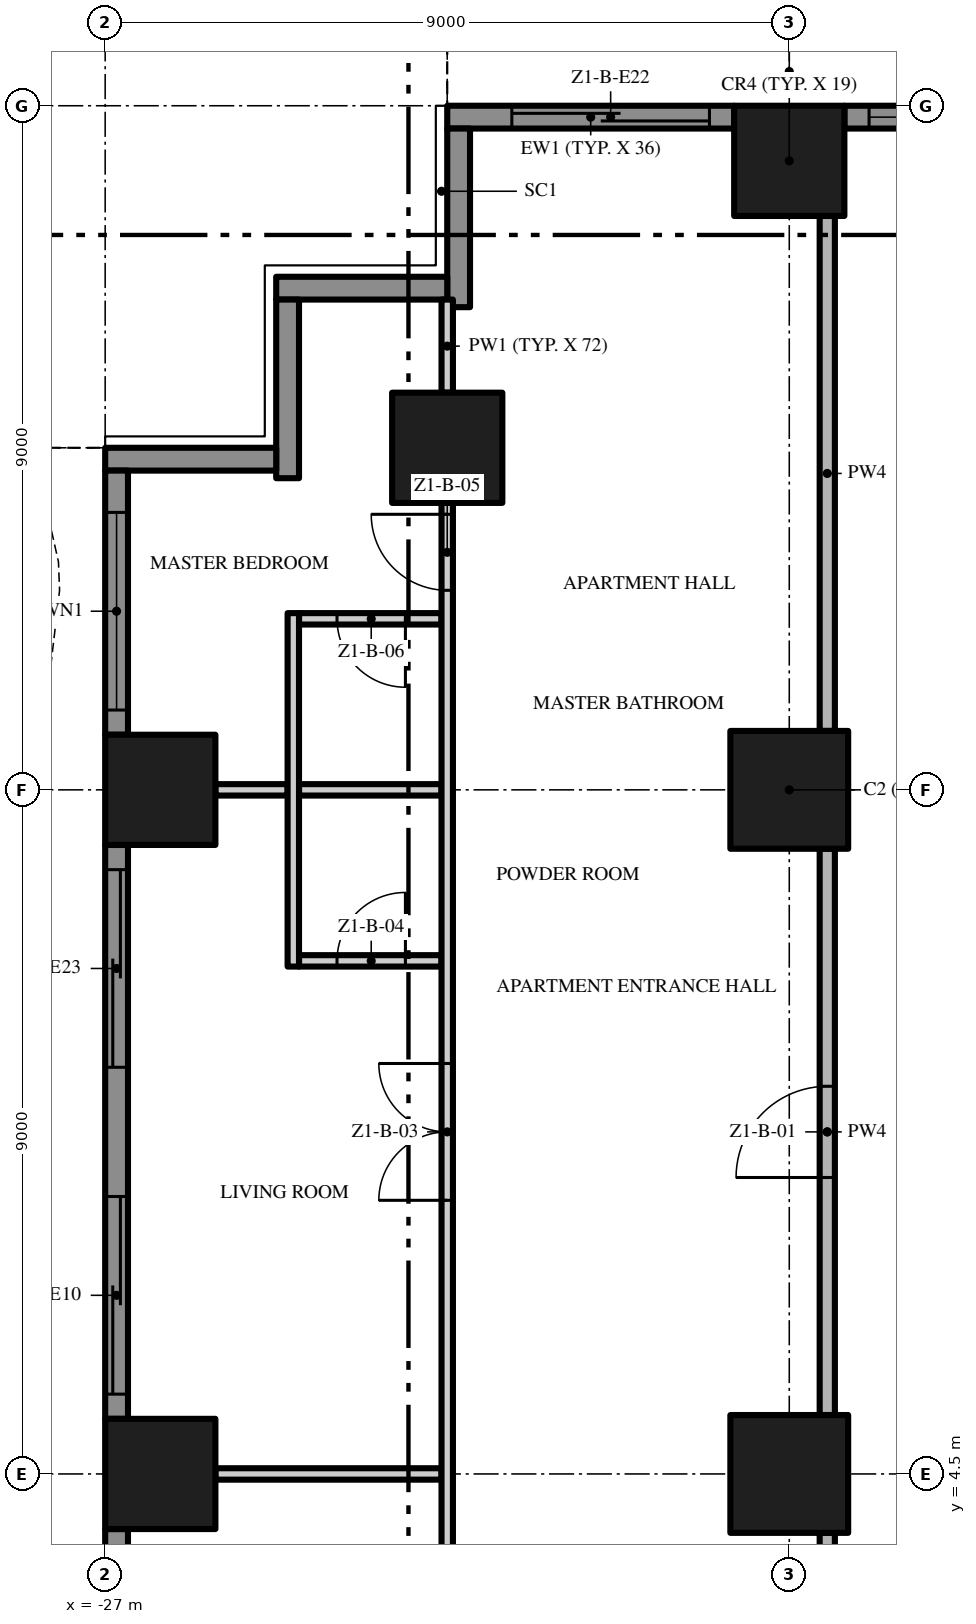
"""IFC4 building model, lengths in metres.
Left out: names, types, materials, properties, quantities, classifications, styles, units other than length and angle.
Written with IfcOpenShell. Run it as: python <this file> out.ifc"""

import sys

from ifc_helpers import new_model, si_unit, direction, frame, frame_2d, origin, origin_2d, place, context, subcontext, project, spatial, polyline, rectangle, outline, extrude, element, fill, save


model = new_model("IFC4")
c1 = context("Model", 3, precision=1e-05, world=origin(), true_north=direction((0.0, 1.0)))
c2 = subcontext(c1, "Body", "Model", "MODEL_VIEW")
j1 = project(units=[si_unit("LENGTHUNIT", "METRE"), si_unit("PLANEANGLEUNIT", "RADIAN")], contexts=[c1])
p1 = place(None, origin())
s1 = spatial("IfcSite", under=j1, at=p1, CompositionType="ELEMENT")
p2 = place(p1, origin())
s2 = spatial("IfcBuilding", under=s1, at=p2, CompositionType="ELEMENT")
p3 = place(p2, frame((0.0, 0.0, 34.0)))
s3 = spatial("IfcBuildingStorey", under=s2, at=p3, CompositionType="ELEMENT", Elevation=34.0)
p4 = place(p3, frame((-18.0, 13.5, 0.0), z_axis=(0.0, 0.0, 1.0), x_axis=(1.0, 0.0, 0.0)))
e1 = element("IfcColumn", 1, at=p4, inside=s3, PredefinedType="COLUMN", context=c2, shape_type="SweptSolid", body=[
    extrude(rectangle(XDim=1.55, YDim=1.55, at=origin_2d()), origin(), (0.0, 0.0, 1.0), 3.5),
])
p5 = place(p3, frame((-18.0, 21.775, 0.0), z_axis=(0.0, 0.0, 1.0), x_axis=(1.0, 0.0, 0.0)))
e2 = element("IfcColumn", 2, at=p5, inside=s3, PredefinedType="COLUMN", context=c2, shape_type="SweptSolid", body=[
    extrude(rectangle(XDim=1.45, YDim=1.45, at=origin_2d()), origin(), (0.0, 0.0, 1.0), 3.5),
])
p6 = place(p3, frame((-18.0, 4.5, 0.0), z_axis=(0.0, 0.0, 1.0), x_axis=(1.0, 0.0, 0.0)))
e3 = element("IfcColumn", 3, at=p6, inside=s3, PredefinedType="COLUMN", context=c2, shape_type="SweptSolid", body=[
    extrude(rectangle(XDim=1.55, YDim=1.55, at=origin_2d()), origin(), (0.0, 0.0, 1.0), 3.5),
])
for number, where, z_axis, x_axis in (
    (4, (-26.275, 13.5, 0.0), (0.0, 0.0, 1.0), (1.0, 0.0, 0.0)),
    (5, (-22.5, 18.0, 0.0), (0.0, 0.0, 1.0), (1.0, 0.0, 0.0)),
    (6, (-26.275, 4.5, 0.0), (0.0, 0.0, 1.0), (1.0, 0.0, 0.0)),
):
    element("IfcColumn", number, at=place(p3, frame(where, z_axis=z_axis, x_axis=x_axis)), inside=s3, PredefinedType="COLUMN", context=c2, shape_type="SweptSolid", body=[
        extrude(rectangle(XDim=1.45, YDim=1.45, at=origin_2d()), origin(), (0.0, 0.0, 1.0), 3.5),
    ])
p7 = place(p3, frame((-17.275, 22.35, 0.0), z_axis=(0.0, 0.0, 1.0), x_axis=(1.0, 0.0, 0.0)))
e7 = element("IfcWall", 7, at=p7, inside=s3, PredefinedType="SOLIDWALL", context=c2, shape_type="SweptSolid", body=[
    extrude(rectangle(XDim=3.775, YDim=0.3, at=frame_2d((1.887, 0.0))), origin(), (0.0, 0.0, 1.0), 3.5),
])
p8 = place(p7, frame((0.325, 0.0, 0.45)))
e8 = element("IfcOpeningElement", 8, at=p8, cuts=e7, PredefinedType="OPENING", context=c2, shape_type="SweptSolid", body=[
    extrude(rectangle(XDim=2.6, YDim=2.65, at=frame_2d((1.3, 1.325))), frame((0.0, 0.16, 0.0), z_axis=(0.0, -1.0, 0.0), x_axis=(1.0, 0.0, 0.0)), (0.0, 0.0, 1.0), 0.32),
])
p9 = place(p3, frame((-22.5, 22.35, 0.0), z_axis=(0.0, 0.0, 1.0), x_axis=(1.0, 0.0, 0.0)))
e9 = element("IfcWall", 9, at=p9, inside=s3, PredefinedType="SOLIDWALL", context=c2, shape_type="SweptSolid", body=[
    extrude(rectangle(XDim=3.775, YDim=0.3, at=frame_2d((1.887, 0.0))), origin(), (0.0, 0.0, 1.0), 3.5),
])
p10 = place(p9, frame((0.85, 0.0, 0.0)))
e10 = element("IfcOpeningElement", 10, at=p10, cuts=e9, PredefinedType="OPENING", context=c2, shape_type="SweptSolid", body=[
    extrude(rectangle(XDim=2.6, YDim=2.4, at=frame_2d((1.3, 1.2))), frame((0.0, 0.16, 0.0), z_axis=(0.0, -1.0, 0.0), x_axis=(1.0, 0.0, 0.0)), (0.0, 0.0, 1.0), 0.32),
])
p11 = place(p3, frame((-22.35, 19.85, 0.0), z_axis=(0.0, 0.0, 1.0), x_axis=(0.0, 1.0, 0.0)))
e11 = element("IfcWall", 11, at=p11, inside=s3, PredefinedType="SOLIDWALL", context=c2, shape_type="SweptSolid", body=[
    extrude(rectangle(XDim=2.35, YDim=0.3, at=frame_2d((1.175, 0.0))), origin(), (0.0, 0.0, 1.0), 3.5),
])
p12 = place(p3, frame((-24.75, 20.1, 0.0), z_axis=(0.0, 0.0, 1.0), x_axis=(1.0, 0.0, 0.0)))
e12 = element("IfcWall", 12, at=p12, inside=s3, PredefinedType="SOLIDWALL", context=c2, shape_type="SweptSolid", body=[
    extrude(rectangle(XDim=2.25, YDim=0.3, at=frame_2d((1.125, 0.0))), origin(), (0.0, 0.0, 1.0), 3.5),
])
p13 = place(p3, frame((-24.6, 17.6, 0.0), z_axis=(0.0, 0.0, 1.0), x_axis=(0.0, 1.0, 0.0)))
e13 = element("IfcWall", 13, at=p13, inside=s3, PredefinedType="SOLIDWALL", context=c2, shape_type="SweptSolid", body=[
    extrude(rectangle(XDim=2.35, YDim=0.3, at=frame_2d((1.175, 0.0))), origin(), (0.0, 0.0, 1.0), 3.5),
])
p14 = place(p3, frame((-27.0, 17.85, 0.0), z_axis=(0.0, 0.0, 1.0), x_axis=(1.0, 0.0, 0.0)))
e14 = element("IfcWall", 14, at=p14, inside=s3, PredefinedType="SOLIDWALL", context=c2, shape_type="SweptSolid", body=[
    extrude(rectangle(XDim=2.25, YDim=0.3, at=frame_2d((1.125, 0.0))), origin(), (0.0, 0.0, 1.0), 3.5),
])
p15 = place(p3, frame((-26.85, 14.225, 0.0), z_axis=(0.0, 0.0, 1.0), x_axis=(0.0, 1.0, 0.0)))
e15 = element("IfcWall", 15, at=p15, inside=s3, PredefinedType="SOLIDWALL", context=c2, shape_type="SweptSolid", body=[
    extrude(rectangle(XDim=3.475, YDim=0.3, at=frame_2d((1.738, 0.0))), origin(), (0.0, 0.0, 1.0), 3.5),
])
p16 = place(p15, frame((0.325, 0.0, 0.45)))
e16 = element("IfcOpeningElement", 16, at=p16, cuts=e15, PredefinedType="OPENING", context=c2, shape_type="SweptSolid", body=[
    extrude(rectangle(XDim=2.6, YDim=2.65, at=frame_2d((1.3, 1.325))), frame((0.0, 0.16, 0.0), z_axis=(0.0, -1.0, 0.0), x_axis=(1.0, 0.0, 0.0)), (0.0, 0.0, 1.0), 0.32),
])
p17 = place(p3, frame((-26.85, 5.225, 0.0), z_axis=(0.0, 0.0, 1.0), x_axis=(0.0, 1.0, 0.0)))
e17 = element("IfcWall", 17, at=p17, inside=s3, PredefinedType="SOLIDWALL", context=c2, shape_type="SweptSolid", body=[
    extrude(rectangle(XDim=7.55, YDim=0.3, at=frame_2d((3.775, 0.0))), origin(), (0.0, 0.0, 1.0), 3.5),
])
p18 = place(p17, frame((4.625, 0.0, 0.0)))
e18 = element("IfcOpeningElement", 18, at=p18, cuts=e17, PredefinedType="OPENING", context=c2, shape_type="SweptSolid", body=[
    extrude(rectangle(XDim=2.6, YDim=2.4, at=frame_2d((1.3, 1.2))), frame((0.0, 0.16, 0.0), z_axis=(0.0, -1.0, 0.0), x_axis=(1.0, 0.0, 0.0)), (0.0, 0.0, 1.0), 0.32),
])
p19 = place(p17, frame((0.325, 0.0, 0.0)))
e19 = element("IfcOpeningElement", 19, at=p19, cuts=e17, PredefinedType="OPENING", context=c2, shape_type="SweptSolid", body=[
    extrude(rectangle(XDim=2.6, YDim=2.4, at=frame_2d((1.3, 1.2))), frame((0.0, 0.16, 0.0), z_axis=(0.0, -1.0, 0.0), x_axis=(1.0, 0.0, 0.0)), (0.0, 0.0, 1.0), 0.32),
])
p20 = place(p3, frame((-26.85, -3.775, 0.0), z_axis=(0.0, 0.0, 1.0), x_axis=(0.0, 1.0, 0.0)))
e20 = element("IfcWall", 20, at=p20, inside=s3, PredefinedType="SOLIDWALL", context=c2, shape_type="SweptSolid", body=[
    extrude(rectangle(XDim=7.55, YDim=0.3, at=frame_2d((3.775, 0.0))), origin(), (0.0, 0.0, 1.0), 3.5),
])
p21 = place(p20, frame((4.625, 0.0, 0.45)))
e21 = element("IfcOpeningElement", 21, at=p21, cuts=e20, PredefinedType="OPENING", context=c2, shape_type="SweptSolid", body=[
    extrude(rectangle(XDim=2.6, YDim=2.65, at=frame_2d((1.3, 1.325))), frame((0.0, 0.16, 0.0), z_axis=(0.0, -1.0, 0.0), x_axis=(1.0, 0.0, 0.0)), (0.0, 0.0, 1.0), 0.32),
])
p22 = place(p20, frame((0.325, 0.0, 0.45)))
e22 = element("IfcOpeningElement", 22, at=p22, cuts=e20, PredefinedType="OPENING", context=c2, shape_type="SweptSolid", body=[
    extrude(rectangle(XDim=2.6, YDim=2.65, at=frame_2d((1.3, 1.325))), frame((0.0, 0.16, 0.0), z_axis=(0.0, -1.0, 0.0), x_axis=(1.0, 0.0, 0.0)), (0.0, 0.0, 1.0), 0.32),
])
p23 = place(p3, origin())
e23 = element("IfcWall", 23, at=p23, inside=s3, PredefinedType="USERDEFINED", context=c2, shape_type="SweptSolid", body=[
    extrude(outline(polyline([(-13.5, 23.451), (-15.0, 23.115), (-15.375, 23.1), (-16.5, 23.231), (-18.0, 23.755), (-19.5, 24.488), (-21.0, 25.149), (-22.5, 25.485), (-22.555, 25.241), (-21.079, 24.91), (-19.605, 24.261), (-18.096, 23.524), (-16.556, 22.986), (-15.385, 22.849), (-14.967, 22.866), (-13.445, 23.208), (-13.5, 23.451)])), origin(), (0.0, 0.0, 1.0), 0.9),
])
p24 = place(p3, origin())
e24 = element("IfcWall", 24, at=p24, inside=s3, PredefinedType="USERDEFINED", context=c2, shape_type="SweptSolid", body=[
    extrude(outline(polyline([(-27.951, 18.0), (-27.615, 16.5), (-27.6, 16.125), (-27.731, 15.0), (-28.255, 13.5), (-28.988, 12.0), (-29.649, 10.5), (-29.985, 9.0), (-30.0, 8.625), (-29.869, 7.5), (-29.345, 6.0), (-28.612, 4.5), (-27.951, 3.0), (-27.615, 1.5), (-27.6, 1.125), (-27.731, 0.0), (-28.255, -1.5), (-28.988, -3.0), (-29.649, -4.5), (-29.985, -6.0), (-30.0, -6.375), (-29.869, -7.5), (-29.345, -9.0), (-28.612, -10.5), (-27.951, -12.0), (-27.615, -13.5), (-27.6, -13.875), (-27.731, -15.0), (-28.255, -16.5), (-28.988, -18.0), (-28.763, -18.11), (-28.024, -16.596), (-27.486, -15.056), (-27.349, -13.885), (-27.366, -13.467), (-27.713, -11.921), (-28.385, -10.395), (-29.114, -8.904), (-29.624, -7.444), (-29.749, -6.365), (-29.736, -6.033), (-29.41, -4.579), (-28.761, -3.105), (-28.024, -1.596), (-27.486, -0.056), (-27.349, 1.115), (-27.366, 1.533), (-27.713, 3.079), (-28.385, 4.605), (-29.114, 6.096), (-29.624, 7.556), (-29.749, 8.635), (-29.736, 8.967), (-29.41, 10.421), (-28.761, 11.895), (-28.024, 13.404), (-27.486, 14.944), (-27.349, 16.115), (-27.366, 16.533), (-27.708, 18.055), (-27.951, 18.0)])), origin(), (0.0, 0.0, 1.0), 0.9),
])
p25 = place(p3, frame((-25.55, 4.5, 0.0), z_axis=(0.0, 0.0, 1.0), x_axis=(1.0, 0.0, 0.0)))
e25 = element("IfcWall", 25, at=p25, inside=s3, PredefinedType="PARTITIONING", context=c2, shape_type="SweptSolid", body=[
    extrude(rectangle(XDim=2.975, YDim=0.15, at=frame_2d((1.488, 0.0))), origin(), (0.0, 0.0, 1.0), 3.5),
])
p26 = place(p3, frame((-24.45, 11.25, 0.0), z_axis=(0.0, 0.0, 1.0), x_axis=(1.0, 0.0, 0.0)))
e26 = element("IfcWall", 26, at=p26, inside=s3, PredefinedType="PARTITIONING", context=c2, shape_type="SweptSolid", body=[
    extrude(rectangle(XDim=1.875, YDim=0.15, at=frame_2d((0.938, 0.0))), origin(), (0.0, 0.0, 1.0), 3.5),
])
p27 = place(p26, frame((0.5, 0.0, 0.0)))
e27 = element("IfcOpeningElement", 27, at=p27, cuts=e26, PredefinedType="OPENING", context=c2, shape_type="SweptSolid", body=[
    extrude(rectangle(XDim=0.9, YDim=2.1, at=frame_2d((0.45, 1.05))), frame((0.0, 0.085, 0.0), z_axis=(0.0, -1.0, 0.0), x_axis=(1.0, 0.0, 0.0)), (0.0, 0.0, 1.0), 0.17),
])
p28 = place(p3, frame((-25.55, 13.5, 0.0), z_axis=(0.0, 0.0, 1.0), x_axis=(1.0, 0.0, 0.0)))
e28 = element("IfcWall", 28, at=p28, inside=s3, PredefinedType="PARTITIONING", context=c2, shape_type="SweptSolid", body=[
    extrude(rectangle(XDim=0.95, YDim=0.15, at=frame_2d((0.475, 0.0))), origin(), (0.0, 0.0, 1.0), 3.5),
])
p29 = place(p3, frame((-24.45, 13.5, 0.0), z_axis=(0.0, 0.0, 1.0), x_axis=(1.0, 0.0, 0.0)))
e29 = element("IfcWall", 29, at=p29, inside=s3, PredefinedType="PARTITIONING", context=c2, shape_type="SweptSolid", body=[
    extrude(rectangle(XDim=1.875, YDim=0.15, at=frame_2d((0.938, 0.0))), origin(), (0.0, 0.0, 1.0), 3.5),
])
p30 = place(p3, frame((-22.575, 15.75, 0.0), z_axis=(0.0, 0.0, 1.0), x_axis=(-1.0, 0.0, 0.0)))
e30 = element("IfcWall", 30, at=p30, inside=s3, PredefinedType="PARTITIONING", context=c2, shape_type="SweptSolid", body=[
    extrude(rectangle(XDim=1.875, YDim=0.15, at=frame_2d((0.938, 0.0))), origin(), (0.0, 0.0, 1.0), 3.5),
])
p31 = place(p30, frame((0.475, 0.0, 0.0)))
e31 = element("IfcOpeningElement", 31, at=p31, cuts=e30, PredefinedType="OPENING", context=c2, shape_type="SweptSolid", body=[
    extrude(rectangle(XDim=0.9, YDim=2.1, at=frame_2d((0.45, 1.05))), frame((0.0, 0.085, 0.0), z_axis=(0.0, -1.0, 0.0), x_axis=(1.0, 0.0, 0.0)), (0.0, 0.0, 1.0), 0.17),
])
p32 = place(p3, frame((-24.525, 11.175, 0.0), z_axis=(0.0, 0.0, 1.0), x_axis=(0.0, 1.0, 0.0)))
e32 = element("IfcWall", 32, at=p32, inside=s3, PredefinedType="PARTITIONING", context=c2, shape_type="SweptSolid", body=[
    extrude(rectangle(XDim=4.65, YDim=0.15, at=frame_2d((2.325, 0.0))), origin(), (0.0, 0.0, 1.0), 3.5),
])
p33 = place(p3, frame((-22.5, 0.1, 0.0), z_axis=(0.0, 0.0, 1.0), x_axis=(0.0, 1.0, 0.0)))
e33 = element("IfcWall", 33, at=p33, inside=s3, PredefinedType="PARTITIONING", context=c2, shape_type="SweptSolid", body=[
    extrude(rectangle(XDim=17.175, YDim=0.15, at=frame_2d((8.588, 0.0))), origin(), (0.0, 0.0, 1.0), 3.5),
])
p34 = place(p33, frame((1.65, 0.0, 0.0)))
e34 = element("IfcOpeningElement", 34, at=p34, cuts=e33, PredefinedType="OPENING", context=c2, shape_type="SweptSolid", body=[
    extrude(rectangle(XDim=1.0, YDim=2.4, at=frame_2d((0.5, 1.2))), frame((0.0, 0.085, 0.0), z_axis=(0.0, -1.0, 0.0), x_axis=(1.0, 0.0, 0.0)), (0.0, 0.0, 1.0), 0.17),
])
p35 = place(p33, frame((8.0, 0.0, 0.0)))
e35 = element("IfcOpeningElement", 35, at=p35, cuts=e33, PredefinedType="OPENING", context=c2, shape_type="SweptSolid", body=[
    extrude(rectangle(XDim=1.8, YDim=2.4, at=frame_2d((0.9, 1.2))), frame((0.0, 0.085, 0.0), z_axis=(0.0, -1.0, 0.0), x_axis=(1.0, 0.0, 0.0)), (0.0, 0.0, 1.0), 0.17),
])
p36 = place(p33, frame((16.025, 0.0, 0.0)))
e36 = element("IfcOpeningElement", 36, at=p36, cuts=e33, PredefinedType="OPENING", context=c2, shape_type="SweptSolid", body=[
    extrude(rectangle(XDim=1.0, YDim=2.4, at=frame_2d((0.5, 1.2))), frame((0.0, 0.085, 0.0), z_axis=(0.0, -1.0, 0.0), x_axis=(1.0, 0.0, 0.0)), (0.0, 0.0, 1.0), 0.17),
])
p37 = place(p3, frame((-22.5, 18.725, 0.0), z_axis=(0.0, 0.0, 1.0), x_axis=(0.0, 1.0, 0.0)))
e37 = element("IfcWall", 37, at=p37, inside=s3, PredefinedType="PARTITIONING", context=c2, shape_type="SweptSolid", body=[
    extrude(rectangle(XDim=1.225, YDim=0.15, at=frame_2d((0.613, 0.0))), origin(), (0.0, 0.0, 1.0), 3.5),
])
p38 = place(p3, frame((-17.5, -0.2, 0.0), z_axis=(0.0, 0.0, 1.0), x_axis=(0.0, 1.0, 0.0)))
e38 = element("IfcWall", 38, at=p38, inside=s3, PredefinedType="PARTITIONING", context=c2, shape_type="SweptSolid", body=[
    extrude(rectangle(XDim=3.925, YDim=0.2, at=frame_2d((1.962, 0.0))), origin(), (0.0, 0.0, 1.0), 3.5),
])
p39 = place(p3, frame((-17.5, 5.275, 0.0), z_axis=(0.0, 0.0, 1.0), x_axis=(0.0, 1.0, 0.0)))
e39 = element("IfcWall", 39, at=p39, inside=s3, PredefinedType="PARTITIONING", context=c2, shape_type="SweptSolid", body=[
    extrude(rectangle(XDim=7.45, YDim=0.2, at=frame_2d((3.725, 0.0))), origin(), (0.0, 0.0, 1.0), 3.5),
])
p40 = place(p39, frame((3.125, 0.0, 0.0)))
e40 = element("IfcOpeningElement", 40, at=p40, cuts=e39, PredefinedType="OPENING", context=c2, shape_type="SweptSolid", body=[
    extrude(rectangle(XDim=1.2, YDim=2.4, at=frame_2d((0.6, 1.2))), frame((0.0, 0.11, 0.0), z_axis=(0.0, -1.0, 0.0), x_axis=(1.0, 0.0, 0.0)), (0.0, 0.0, 1.0), 0.22),
])
p41 = place(p3, frame((-17.5, 14.275, 0.0), z_axis=(0.0, 0.0, 1.0), x_axis=(0.0, 1.0, 0.0)))
e41 = element("IfcWall", 41, at=p41, inside=s3, PredefinedType="PARTITIONING", context=c2, shape_type="SweptSolid", body=[
    extrude(rectangle(XDim=6.775, YDim=0.2, at=frame_2d((3.388, 0.0))), origin(), (0.0, 0.0, 1.0), 3.5),
])
p42 = place(p8, origin())
e42 = element("IfcWindow", 42, at=p42, inside=s3, PartitioningType="SINGLE_PANEL", PredefinedType="WINDOW", context=c2, shape_type="SweptSolid", body=[
    extrude(rectangle(XDim=2.6, YDim=2.65, at=frame_2d((1.3, 1.325))), frame((0.0, 0.03, 0.0), z_axis=(0.0, -1.0, 0.0), x_axis=(1.0, 0.0, 0.0)), (0.0, 0.0, 1.0), 0.06),
])
fill(e8, e42)
p43 = place(p10, origin())
e43 = element("IfcDoor", 43, at=p43, inside=s3, OperationType="SINGLE_SWING_LEFT", PredefinedType="DOOR", context=c2, shape_type="SweptSolid", body=[
    extrude(rectangle(XDim=2.6, YDim=2.4, at=frame_2d((1.3, 1.2))), frame((0.0, 0.025, 0.0), z_axis=(0.0, -1.0, 0.0), x_axis=(1.0, 0.0, 0.0)), (0.0, 0.0, 1.0), 0.05),
])
fill(e10, e43)
p44 = place(p16, origin())
e44 = element("IfcWindow", 44, at=p44, inside=s3, PartitioningType="SINGLE_PANEL", PredefinedType="WINDOW", context=c2, shape_type="SweptSolid", body=[
    extrude(rectangle(XDim=2.6, YDim=2.65, at=frame_2d((1.3, 1.325))), frame((0.0, 0.03, 0.0), z_axis=(0.0, -1.0, 0.0), x_axis=(1.0, 0.0, 0.0)), (0.0, 0.0, 1.0), 0.06),
])
fill(e16, e44)
p45 = place(p18, origin())
e45 = element("IfcDoor", 45, at=p45, inside=s3, OperationType="SINGLE_SWING_LEFT", PredefinedType="DOOR", context=c2, shape_type="SweptSolid", body=[
    extrude(rectangle(XDim=2.6, YDim=2.4, at=frame_2d((1.3, 1.2))), frame((0.0, 0.025, 0.0), z_axis=(0.0, -1.0, 0.0), x_axis=(1.0, 0.0, 0.0)), (0.0, 0.0, 1.0), 0.05),
])
fill(e18, e45)
p46 = place(p19, origin())
e46 = element("IfcDoor", 46, at=p46, inside=s3, OperationType="SINGLE_SWING_LEFT", PredefinedType="DOOR", context=c2, shape_type="SweptSolid", body=[
    extrude(rectangle(XDim=2.6, YDim=2.4, at=frame_2d((1.3, 1.2))), frame((0.0, 0.025, 0.0), z_axis=(0.0, -1.0, 0.0), x_axis=(1.0, 0.0, 0.0)), (0.0, 0.0, 1.0), 0.05),
])
fill(e19, e46)
p47 = place(p40, origin())
e47 = element("IfcDoor", 47, at=p47, inside=s3, OperationType="SINGLE_SWING_LEFT", PredefinedType="DOOR", context=c2, shape_type="SweptSolid", body=[
    extrude(rectangle(XDim=1.2, YDim=2.4, at=frame_2d((0.6, 1.2))), frame((0.0, 0.025, 0.0), z_axis=(0.0, -1.0, 0.0), x_axis=(1.0, 0.0, 0.0)), (0.0, 0.0, 1.0), 0.05),
])
fill(e40, e47)
p48 = place(p35, origin())
e48 = element("IfcDoor", 48, at=p48, inside=s3, OperationType="DOUBLE_DOOR_SINGLE_SWING", PredefinedType="DOOR", context=c2, shape_type="SweptSolid", body=[
    extrude(rectangle(XDim=1.8, YDim=2.4, at=frame_2d((0.9, 1.2))), frame((0.0, 0.025, 0.0), z_axis=(0.0, -1.0, 0.0), x_axis=(1.0, 0.0, 0.0)), (0.0, 0.0, 1.0), 0.05),
])
fill(e35, e48)
p49 = place(p27, origin())
e49 = element("IfcDoor", 49, at=p49, inside=s3, OperationType="SINGLE_SWING_RIGHT", PredefinedType="DOOR", context=c2, shape_type="SweptSolid", body=[
    extrude(rectangle(XDim=0.9, YDim=2.1, at=frame_2d((0.45, 1.05))), frame((0.0, 0.025, 0.0), z_axis=(0.0, -1.0, 0.0), x_axis=(1.0, 0.0, 0.0)), (0.0, 0.0, 1.0), 0.05),
])
fill(e27, e49)
p50 = place(p36, origin())
e50 = element("IfcDoor", 50, at=p50, inside=s3, OperationType="SINGLE_SWING_RIGHT", PredefinedType="DOOR", context=c2, shape_type="SweptSolid", body=[
    extrude(rectangle(XDim=1.0, YDim=2.4, at=frame_2d((0.5, 1.2))), frame((0.0, 0.025, 0.0), z_axis=(0.0, -1.0, 0.0), x_axis=(1.0, 0.0, 0.0)), (0.0, 0.0, 1.0), 0.05),
])
fill(e36, e50)
p51 = place(p31, origin())
e51 = element("IfcDoor", 51, at=p51, inside=s3, OperationType="SINGLE_SWING_LEFT", PredefinedType="DOOR", context=c2, shape_type="SweptSolid", body=[
    extrude(rectangle(XDim=0.9, YDim=2.1, at=frame_2d((0.45, 1.05))), frame((0.0, 0.025, 0.0), z_axis=(0.0, -1.0, 0.0), x_axis=(1.0, 0.0, 0.0)), (0.0, 0.0, 1.0), 0.05),
])
fill(e31, e51)
save(model, sys.argv[1])
